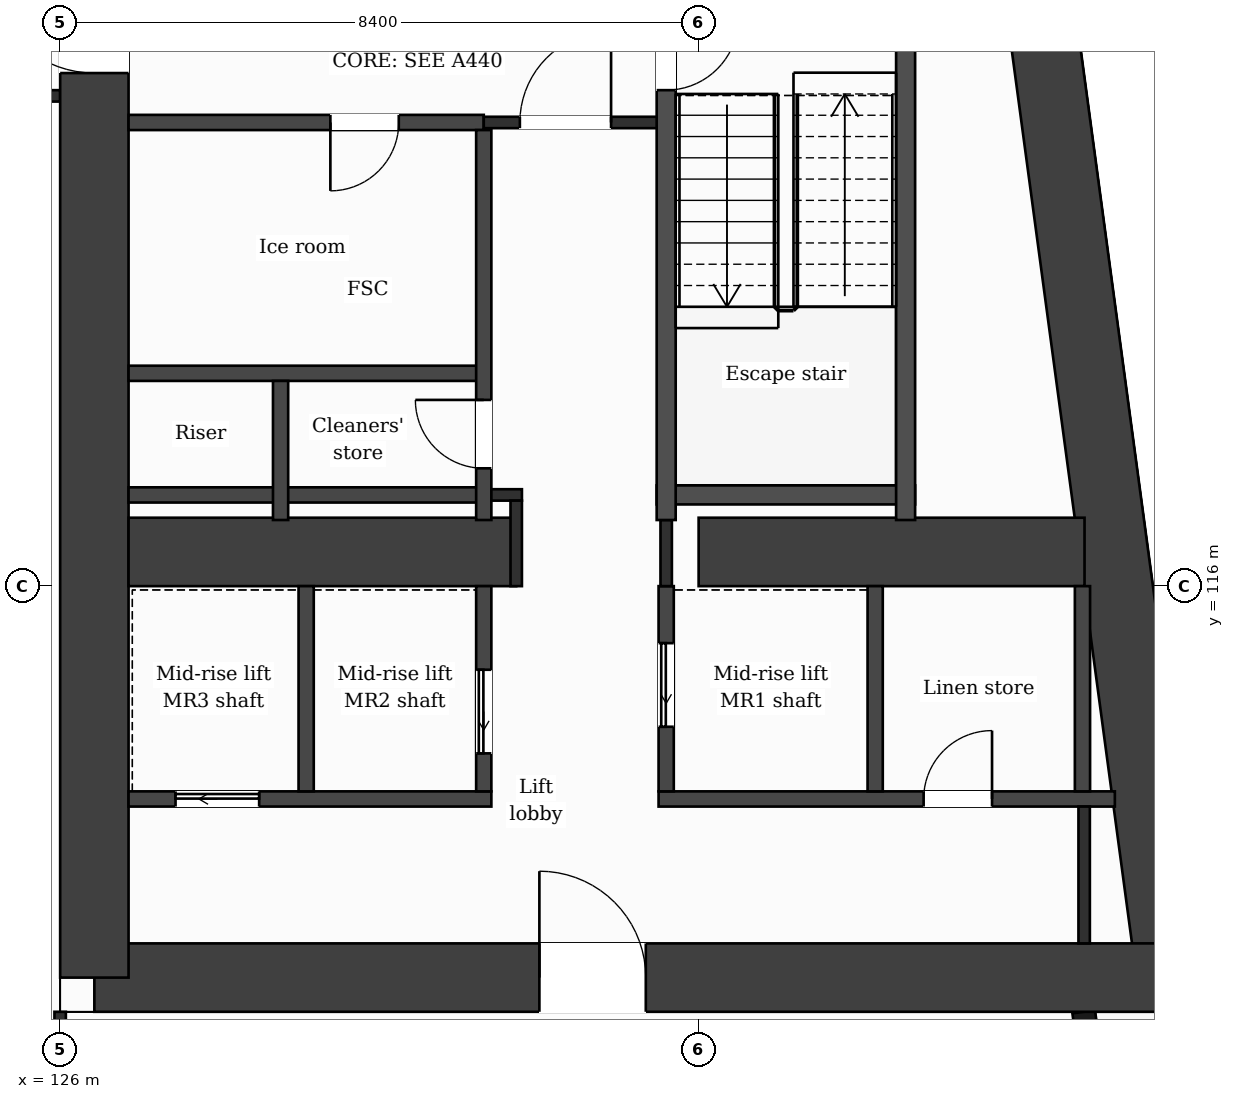
"""IFC4 building model, lengths in metres.
Left out: names, types, materials, properties, quantities, classifications, styles, units other than length and angle.
Written with IfcOpenShell. Run it as: python <this file> out.ifc"""

import sys

from ifc_helpers import new_model, si_unit, direction, frame, frame_2d, origin, place, context, subcontext, project, spatial, rectangle, extrude, element, fill, save


model = new_model("IFC4")
c1 = context("Model", 3, precision=1e-05, world=origin(), true_north=direction((0.0, 1.0)))
c2 = subcontext(c1, "Body", "Model", "MODEL_VIEW")
j1 = project(units=[si_unit("LENGTHUNIT", "METRE"), si_unit("PLANEANGLEUNIT", "RADIAN")], contexts=[c1])
p1 = place(None, origin())
s1 = spatial("IfcSite", under=j1, at=p1, CompositionType="ELEMENT")
p2 = place(p1, origin())
s2 = spatial("IfcBuilding", under=s1, at=p2, CompositionType="ELEMENT")
p3 = place(p2, frame((0.0, 0.0, 166.3)))
s3 = spatial("IfcBuildingStorey", under=s2, at=p3, CompositionType="ELEMENT", Elevation=166.3)
p4 = place(p3, frame((137.776, 131.95, 0.0), z_axis=(0.0, 0.0, 1.0), x_axis=(0.133421759112, -0.991059349482, 0.0)))
e1 = element("IfcWall", 1, at=p4, inside=s3, PredefinedType="SHEAR", context=c2, shape_type="SweptSolid", body=[
    extrude(rectangle(XDim=21.29, YDim=0.9, at=frame_2d((10.645, 0.0))), origin(), (0.0, 0.0, 1.0), 3.7),
])
p5 = place(p3, frame((140.616, 110.85, 0.0), z_axis=(0.0, 0.0, 1.0), x_axis=(-1.0, 0.0, 0.0)))
e2 = element("IfcWall", 2, at=p5, inside=s3, PredefinedType="SHEAR", context=c2, shape_type="SweptSolid", body=[
    extrude(rectangle(XDim=14.166, YDim=0.9, at=frame_2d((7.083, 0.0))), origin(), (0.0, 0.0, 1.0), 3.7),
])
p6 = place(p5, frame((6.911, 0.0, 0.0)))
e3 = element("IfcOpeningElement", 3, at=p6, cuts=e2, PredefinedType="OPENING", context=c2, shape_type="SweptSolid", body=[
    extrude(rectangle(XDim=1.4, YDim=2.1, at=frame_2d((0.7, 1.05))), frame((0.0, 0.46, 0.0), z_axis=(0.0, -1.0, 0.0), x_axis=(1.0, 0.0, 0.0)), (0.0, 0.0, 1.0), 0.92),
])
p7 = place(p3, frame((126.45, 110.85, 0.0), z_axis=(0.0, 0.0, 1.0), x_axis=(0.0, 1.0, 0.0)))
e4 = element("IfcWall", 4, at=p7, inside=s3, PredefinedType="SHEAR", context=c2, shape_type="SweptSolid", body=[
    extrude(rectangle(XDim=21.1, YDim=0.9, at=frame_2d((10.55, 0.0))), origin(), (0.0, 0.0, 1.0), 3.7),
])
p8 = place(p7, frame((11.9, 0.0, 0.0)))
e5 = element("IfcOpeningElement", 5, at=p8, cuts=e4, PredefinedType="OPENING", context=c2, shape_type="SweptSolid", body=[
    extrude(rectangle(XDim=1.4, YDim=2.1, at=frame_2d((0.7, 1.05))), frame((0.0, 0.46, 0.0), z_axis=(0.0, -1.0, 0.0), x_axis=(1.0, 0.0, 0.0)), (0.0, 0.0, 1.0), 0.92),
])
p9 = place(p3, frame((126.9, 116.45, 0.0), z_axis=(0.0, 0.0, 1.0), x_axis=(1.0, 0.0, 0.0)))
e6 = element("IfcWall", 6, at=p9, inside=s3, PredefinedType="SHEAR", context=c2, shape_type="SweptSolid", body=[
    extrude(rectangle(XDim=5.1, YDim=0.9, at=frame_2d((2.55, 0.0))), origin(), (0.0, 0.0, 1.0), 3.7),
])
p10 = place(p3, frame((134.4, 116.45, 0.0), z_axis=(0.0, 0.0, 1.0), x_axis=(1.0, 0.0, 0.0)))
e7 = element("IfcWall", 7, at=p10, inside=s3, PredefinedType="SHEAR", context=c2, shape_type="SweptSolid", body=[
    extrude(rectangle(XDim=5.077, YDim=0.9, at=frame_2d((2.539, 0.0))), origin(), (0.0, 0.0, 1.0), 3.7),
])
p11 = place(p3, frame((140.348, 103.85, 0.0), z_axis=(0.0, 0.0, 1.0), x_axis=(-0.133431549479, 0.991058031401, 0.0)))
e8 = element("IfcWall", 8, at=p11, inside=s3, PredefinedType="SOLIDWALL", context=c2, shape_type="SweptSolid", body=[
    extrude(rectangle(XDim=6.609, YDim=0.3, at=frame_2d((3.304, 0.0))), origin(), (0.0, 0.0, 1.0), 3.38),
])
p12 = place(p11, frame((0.737, 0.0, 0.9)))
e9 = element("IfcOpeningElement", 9, at=p12, cuts=e8, PredefinedType="OPENING", context=c2, shape_type="SweptSolid", body=[
    extrude(rectangle(XDim=1.2, YDim=2.1, at=frame_2d((0.6, 1.05))), frame((0.0, 0.16, 0.0), z_axis=(0.0, -1.0, 0.0), x_axis=(1.0, 0.0, 0.0)), (0.0, 0.0, 1.0), 0.32),
])
p13 = place(p11, frame((3.991, 0.0, 0.0)))
e10 = element("IfcOpeningElement", 10, at=p13, cuts=e8, PredefinedType="OPENING", context=c2, shape_type="SweptSolid", body=[
    extrude(rectangle(XDim=1.2, YDim=2.4, at=frame_2d((0.6, 1.2))), frame((0.0, 0.16, 0.0), z_axis=(0.0, -1.0, 0.0), x_axis=(1.0, 0.0, 0.0)), (0.0, 0.0, 1.0), 0.32),
])
p14 = place(p3, frame((126.9, 113.2, 0.0), z_axis=(0.0, 0.0, 1.0), x_axis=(1.0, 0.0, 0.0)))
e11 = element("IfcWall", 11, at=p14, inside=s3, PredefinedType="PARTITIONING", context=c2, shape_type="SweptSolid", body=[
    extrude(rectangle(XDim=4.773, YDim=0.2, at=frame_2d((2.387, 0.0))), origin(), (0.0, 0.0, 1.0), 3.38),
])
p15 = place(p14, frame((0.618, 0.0, 0.0)))
e12 = element("IfcOpeningElement", 12, at=p15, cuts=e11, PredefinedType="OPENING", context=c2, shape_type="SweptSolid", body=[
    extrude(rectangle(XDim=1.1, YDim=2.1, at=frame_2d((0.55, 1.05))), frame((0.0, 0.11, 0.0), z_axis=(0.0, -1.0, 0.0), x_axis=(1.0, 0.0, 0.0)), (0.0, 0.0, 1.0), 0.22),
])
p16 = place(p3, frame((133.873, 113.2, 0.0), z_axis=(0.0, 0.0, 1.0), x_axis=(1.0, 0.0, 0.0)))
e13 = element("IfcWall", 13, at=p16, inside=s3, PredefinedType="PARTITIONING", context=c2, shape_type="SweptSolid", body=[
    extrude(rectangle(XDim=6.003, YDim=0.2, at=frame_2d((3.001, 0.0))), origin(), (0.0, 0.0, 1.0), 3.38),
])
p17 = place(p16, frame((3.487, 0.0, 0.0)))
e14 = element("IfcOpeningElement", 14, at=p17, cuts=e13, PredefinedType="OPENING", context=c2, shape_type="SweptSolid", body=[
    extrude(rectangle(XDim=0.9, YDim=2.1, at=frame_2d((0.45, 1.05))), frame((0.0, 0.11, 0.0), z_axis=(0.0, -1.0, 0.0), x_axis=(1.0, 0.0, 0.0)), (0.0, 0.0, 1.0), 0.22),
])
p18 = place(p3, frame((126.9, 117.2, 0.0), z_axis=(0.0, 0.0, 1.0), x_axis=(1.0, 0.0, 0.0)))
e15 = element("IfcWall", 15, at=p18, inside=s3, PredefinedType="PARTITIONING", context=c2, shape_type="SweptSolid", body=[
    extrude(rectangle(XDim=4.673, YDim=0.2, at=frame_2d((2.336, 0.0))), origin(), (0.0, 0.0, 1.0), 3.38),
])
p19 = place(p3, frame((131.573, 117.2, 0.0), z_axis=(0.0, 0.0, 1.0), x_axis=(1.0, 0.0, 0.0)))
e16 = element("IfcWall", 16, at=p19, inside=s3, PredefinedType="PARTITIONING", context=c2, shape_type="SweptSolid", body=[
    extrude(rectangle(XDim=0.502, YDim=0.15, at=frame_2d((0.251, 0.0))), origin(), (0.0, 0.0, 1.0), 3.38),
])
p20 = place(p3, frame((133.848, 117.2, 0.0), z_axis=(0.0, 0.0, 1.0), x_axis=(1.0, 0.0, 0.0)))
e17 = element("IfcWall", 17, at=p20, inside=s3, PredefinedType="PARTITIONING", context=c2, shape_type="SweptSolid", body=[
    extrude(rectangle(XDim=3.4, YDim=0.25, at=frame_2d((1.7, 0.0))), origin(), (0.0, 0.0, 1.0), 3.38),
])
p21 = place(p3, frame((126.9, 118.8, 0.0), z_axis=(0.0, 0.0, 1.0), x_axis=(1.0, 0.0, 0.0)))
e18 = element("IfcWall", 18, at=p21, inside=s3, PredefinedType="PARTITIONING", context=c2, shape_type="SweptSolid", body=[
    extrude(rectangle(XDim=4.673, YDim=0.2, at=frame_2d((2.336, 0.0))), origin(), (0.0, 0.0, 1.0), 3.38),
])
p22 = place(p3, frame((126.9, 122.1, 0.0), z_axis=(0.0, 0.0, 1.0), x_axis=(1.0, 0.0, 0.0)))
e19 = element("IfcWall", 19, at=p22, inside=s3, PredefinedType="PARTITIONING", context=c2, shape_type="SweptSolid", body=[
    extrude(rectangle(XDim=4.673, YDim=0.2, at=frame_2d((2.336, 0.0))), origin(), (0.0, 0.0, 1.0), 3.38),
])
p23 = place(p22, frame((2.655, 0.0, 0.0)))
e20 = element("IfcOpeningElement", 20, at=p23, cuts=e19, PredefinedType="OPENING", context=c2, shape_type="SweptSolid", body=[
    extrude(rectangle(XDim=0.9, YDim=2.1, at=frame_2d((0.45, 1.05))), frame((0.0, 0.11, 0.0), z_axis=(0.0, -1.0, 0.0), x_axis=(1.0, 0.0, 0.0)), (0.0, 0.0, 1.0), 0.22),
])
p24 = place(p3, frame((131.573, 122.1, 0.0), z_axis=(0.0, 0.0, 1.0), x_axis=(1.0, 0.0, 0.0)))
e21 = element("IfcWall", 21, at=p24, inside=s3, PredefinedType="PARTITIONING", context=c2, shape_type="SweptSolid", body=[
    extrude(rectangle(XDim=2.4, YDim=0.15, at=frame_2d((1.2, 0.0))), origin(), (0.0, 0.0, 1.0), 3.38),
])
p25 = place(p24, frame((0.475, 0.0, 0.0)))
e22 = element("IfcOpeningElement", 22, at=p25, cuts=e21, PredefinedType="OPENING", context=c2, shape_type="SweptSolid", body=[
    extrude(rectangle(XDim=1.2, YDim=2.1, at=frame_2d((0.6, 1.05))), frame((0.0, 0.085, 0.0), z_axis=(0.0, -1.0, 0.0), x_axis=(1.0, 0.0, 0.0)), (0.0, 0.0, 1.0), 0.17),
])
p26 = place(p3, frame((100.8, 122.45, 0.0), z_axis=(0.0, 0.0, 1.0), x_axis=(1.0, 0.0, 0.0)))
e23 = element("IfcWall", 23, at=p26, inside=s3, PredefinedType="PARTITIONING", context=c2, shape_type="SweptSolid", body=[
    extrude(rectangle(XDim=25.2, YDim=0.15, at=frame_2d((12.6, 0.0))), origin(), (0.0, 0.0, 1.0), 3.38),
])
p27 = place(p3, frame((126.0, 109.075, 0.0), z_axis=(0.0, 0.0, 1.0), x_axis=(0.0, 1.0, 0.0)))
e24 = element("IfcWall", 24, at=p27, inside=s3, PredefinedType="PARTITIONING", context=c2, shape_type="SweptSolid", body=[
    extrude(rectangle(XDim=1.325, YDim=0.15, at=frame_2d((0.663, 0.0))), origin(), (0.0, 0.0, 1.0), 3.38),
])
p28 = place(p3, frame((128.9, 116.87, 0.0), z_axis=(0.0, 0.0, 1.0), x_axis=(0.0, 1.0, 0.0)))
e25 = element("IfcWall", 25, at=p28, inside=s3, PredefinedType="PARTITIONING", context=c2, shape_type="SweptSolid", body=[
    extrude(rectangle(XDim=1.83, YDim=0.2, at=frame_2d((0.915, 0.0))), origin(), (0.0, 0.0, 1.0), 3.38),
])
p29 = place(p3, frame((129.237, 113.3, 0.0), z_axis=(0.0, 0.0, 1.0), x_axis=(0.0, 1.0, 0.0)))
e26 = element("IfcWall", 26, at=p29, inside=s3, PredefinedType="PARTITIONING", context=c2, shape_type="SweptSolid", body=[
    extrude(rectangle(XDim=2.7, YDim=0.2, at=frame_2d((1.35, 0.0))), origin(), (0.0, 0.0, 1.0), 3.38),
])
p30 = place(p3, frame((131.573, 113.3, 0.0), z_axis=(0.0, 0.0, 1.0), x_axis=(0.0, 1.0, 0.0)))
e27 = element("IfcWall", 27, at=p30, inside=s3, PredefinedType="PARTITIONING", context=c2, shape_type="SweptSolid", body=[
    extrude(rectangle(XDim=2.7, YDim=0.2, at=frame_2d((1.35, 0.0))), origin(), (0.0, 0.0, 1.0), 3.38),
])
p31 = place(p30, frame((0.5, 0.0, 0.0)))
e28 = element("IfcOpeningElement", 28, at=p31, cuts=e27, PredefinedType="OPENING", context=c2, shape_type="SweptSolid", body=[
    extrude(rectangle(XDim=1.1, YDim=2.1, at=frame_2d((0.55, 1.05))), frame((0.0, 0.11, 0.0), z_axis=(0.0, -1.0, 0.0), x_axis=(1.0, 0.0, 0.0)), (0.0, 0.0, 1.0), 0.22),
])
p32 = place(p3, frame((131.573, 116.87, 0.0), z_axis=(0.0, 0.0, 1.0), x_axis=(0.0, 1.0, 0.0)))
e29 = element("IfcWall", 29, at=p32, inside=s3, PredefinedType="PARTITIONING", context=c2, shape_type="SweptSolid", body=[
    extrude(rectangle(XDim=5.13, YDim=0.2, at=frame_2d((2.565, 0.0))), origin(), (0.0, 0.0, 1.0), 3.38),
])
p33 = place(p32, frame((0.68, 0.0, 0.0)))
e30 = element("IfcOpeningElement", 30, at=p33, cuts=e29, PredefinedType="OPENING", context=c2, shape_type="SweptSolid", body=[
    extrude(rectangle(XDim=0.9, YDim=2.1, at=frame_2d((0.45, 1.05))), frame((0.0, 0.11, 0.0), z_axis=(0.0, -1.0, 0.0), x_axis=(1.0, 0.0, 0.0)), (0.0, 0.0, 1.0), 0.22),
])
p34 = place(p3, frame((132.0, 116.0, 0.0), z_axis=(0.0, 0.0, 1.0), x_axis=(0.0, 1.0, 0.0)))
e31 = element("IfcWall", 31, at=p34, inside=s3, PredefinedType="PARTITIONING", context=c2, shape_type="SweptSolid", body=[
    extrude(rectangle(XDim=1.125, YDim=0.15, at=frame_2d((0.562, 0.0))), origin(), (0.0, 0.0, 1.0), 3.38),
])
p35 = place(p3, frame((133.973, 113.3, 0.0), z_axis=(0.0, 0.0, 1.0), x_axis=(0.0, 1.0, 0.0)))
e32 = element("IfcWall", 32, at=p35, inside=s3, PredefinedType="PARTITIONING", context=c2, shape_type="SweptSolid", body=[
    extrude(rectangle(XDim=2.7, YDim=0.2, at=frame_2d((1.35, 0.0))), origin(), (0.0, 0.0, 1.0), 3.38),
])
p36 = place(p35, frame((0.85, 0.0, 0.0)))
e33 = element("IfcOpeningElement", 33, at=p36, cuts=e32, PredefinedType="OPENING", context=c2, shape_type="SweptSolid", body=[
    extrude(rectangle(XDim=1.1, YDim=2.1, at=frame_2d((0.55, 1.05))), frame((0.0, 0.11, 0.0), z_axis=(0.0, -1.0, 0.0), x_axis=(1.0, 0.0, 0.0)), (0.0, 0.0, 1.0), 0.22),
])
p37 = place(p3, frame((133.973, 116.0, 0.0), z_axis=(0.0, 0.0, 1.0), x_axis=(0.0, 1.0, 0.0)))
e34 = element("IfcWall", 34, at=p37, inside=s3, PredefinedType="PARTITIONING", context=c2, shape_type="SweptSolid", body=[
    extrude(rectangle(XDim=0.87, YDim=0.15, at=frame_2d((0.435, 0.0))), origin(), (0.0, 0.0, 1.0), 3.38),
])
p38 = place(p3, frame((133.973, 116.87, 0.0), z_axis=(0.0, 0.0, 1.0), x_axis=(0.0, 1.0, 0.0)))
e35 = element("IfcWall", 35, at=p38, inside=s3, PredefinedType="PARTITIONING", context=c2, shape_type="SweptSolid", body=[
    extrude(rectangle(XDim=6.955, YDim=0.25, at=frame_2d((3.478, 0.0))), origin(), (0.0, 0.0, 1.0), 3.38),
])
p39 = place(p38, frame((5.655, 0.0, 0.0)))
e36 = element("IfcOpeningElement", 36, at=p39, cuts=e35, PredefinedType="OPENING", context=c2, shape_type="SweptSolid", body=[
    extrude(rectangle(XDim=0.95, YDim=2.1, at=frame_2d((0.475, 1.05))), frame((0.0, 0.135, 0.0), z_axis=(0.0, -1.0, 0.0), x_axis=(1.0, 0.0, 0.0)), (0.0, 0.0, 1.0), 0.27),
])
p40 = place(p3, frame((136.722, 113.3, 0.0), z_axis=(0.0, 0.0, 1.0), x_axis=(0.0, 1.0, 0.0)))
e37 = element("IfcWall", 37, at=p40, inside=s3, PredefinedType="PARTITIONING", context=c2, shape_type="SweptSolid", body=[
    extrude(rectangle(XDim=2.7, YDim=0.2, at=frame_2d((1.35, 0.0))), origin(), (0.0, 0.0, 1.0), 3.38),
])
p41 = place(p3, frame((137.123, 116.87, 0.0), z_axis=(0.0, 0.0, 1.0), x_axis=(0.0, 1.0, 0.0)))
e38 = element("IfcWall", 38, at=p41, inside=s3, PredefinedType="PARTITIONING", context=c2, shape_type="SweptSolid", body=[
    extrude(rectangle(XDim=6.955, YDim=0.25, at=frame_2d((3.478, 0.0))), origin(), (0.0, 0.0, 1.0), 3.38),
])
p42 = place(p3, frame((139.45, 113.3, 0.0), z_axis=(0.0, 0.0, 1.0), x_axis=(0.0, 1.0, 0.0)))
e39 = element("IfcWall", 39, at=p42, inside=s3, PredefinedType="PARTITIONING", context=c2, shape_type="SweptSolid", body=[
    extrude(rectangle(XDim=2.7, YDim=0.2, at=frame_2d((1.35, 0.0))), origin(), (0.0, 0.0, 1.0), 3.38),
])
p43 = place(p3, frame((139.472, 111.3, 0.0), z_axis=(0.0, 0.0, 1.0), x_axis=(0.0, 1.0, 0.0)))
e40 = element("IfcWall", 40, at=p43, inside=s3, PredefinedType="PARTITIONING", context=c2, shape_type="SweptSolid", body=[
    extrude(rectangle(XDim=1.8, YDim=0.15, at=frame_2d((0.9, 0.0))), origin(), (0.0, 0.0, 1.0), 3.38),
])
p44 = place(p25, origin())
e41 = element("IfcDoor", 41, at=p44, inside=s3, OperationType="SINGLE_SWING_RIGHT", PredefinedType="DOOR", context=c2, shape_type="SweptSolid", body=[
    extrude(rectangle(XDim=1.2, YDim=2.1, at=frame_2d((0.6, 1.05))), frame((0.0, 0.025, 0.0), z_axis=(0.0, -1.0, 0.0), x_axis=(1.0, 0.0, 0.0)), (0.0, 0.0, 1.0), 0.05),
])
fill(e22, e41)
p45 = place(p23, origin())
e42 = element("IfcDoor", 42, at=p45, inside=s3, OperationType="SINGLE_SWING_LEFT", PredefinedType="DOOR", context=c2, shape_type="SweptSolid", body=[
    extrude(rectangle(XDim=0.9, YDim=2.1, at=frame_2d((0.45, 1.05))), frame((0.0, 0.025, 0.0), z_axis=(0.0, -1.0, 0.0), x_axis=(1.0, 0.0, 0.0)), (0.0, 0.0, 1.0), 0.05),
])
fill(e20, e42)
p46 = place(p39, origin())
e43 = element("IfcDoor", 43, at=p46, inside=s3, OperationType="SINGLE_SWING_RIGHT", PredefinedType="DOOR", context=c2, shape_type="SweptSolid", body=[
    extrude(rectangle(XDim=0.95, YDim=2.1, at=frame_2d((0.475, 1.05))), frame((0.0, 0.025, 0.0), z_axis=(0.0, -1.0, 0.0), x_axis=(1.0, 0.0, 0.0)), (0.0, 0.0, 1.0), 0.05),
])
fill(e36, e43)
p47 = place(p33, origin())
e44 = element("IfcDoor", 44, at=p47, inside=s3, OperationType="SINGLE_SWING_RIGHT", PredefinedType="DOOR", context=c2, shape_type="SweptSolid", body=[
    extrude(rectangle(XDim=0.9, YDim=2.1, at=frame_2d((0.45, 1.05))), frame((0.0, 0.025, 0.0), z_axis=(0.0, -1.0, 0.0), x_axis=(1.0, 0.0, 0.0)), (0.0, 0.0, 1.0), 0.05),
])
fill(e30, e44)
p48 = place(p36, origin())
e45 = element("IfcDoor", 45, at=p48, inside=s3, OperationType="SLIDING_TO_LEFT", PredefinedType="DOOR", context=c2, shape_type="SweptSolid", body=[
    extrude(rectangle(XDim=1.1, YDim=2.1, at=frame_2d((0.55, 1.05))), frame((0.0, 0.025, 0.0), z_axis=(0.0, -1.0, 0.0), x_axis=(1.0, 0.0, 0.0)), (0.0, 0.0, 1.0), 0.05),
])
fill(e33, e45)
p49 = place(p31, origin())
e46 = element("IfcDoor", 46, at=p49, inside=s3, OperationType="SLIDING_TO_LEFT", PredefinedType="DOOR", context=c2, shape_type="SweptSolid", body=[
    extrude(rectangle(XDim=1.1, YDim=2.1, at=frame_2d((0.55, 1.05))), frame((0.0, 0.025, 0.0), z_axis=(0.0, -1.0, 0.0), x_axis=(1.0, 0.0, 0.0)), (0.0, 0.0, 1.0), 0.05),
])
fill(e28, e46)
p50 = place(p15, origin())
e47 = element("IfcDoor", 47, at=p50, inside=s3, OperationType="SLIDING_TO_LEFT", PredefinedType="DOOR", context=c2, shape_type="SweptSolid", body=[
    extrude(rectangle(XDim=1.1, YDim=2.1, at=frame_2d((0.55, 1.05))), frame((0.0, 0.025, 0.0), z_axis=(0.0, -1.0, 0.0), x_axis=(1.0, 0.0, 0.0)), (0.0, 0.0, 1.0), 0.05),
])
fill(e12, e47)
p51 = place(p17, origin())
e48 = element("IfcDoor", 48, at=p51, inside=s3, OperationType="SINGLE_SWING_RIGHT", PredefinedType="DOOR", context=c2, shape_type="SweptSolid", body=[
    extrude(rectangle(XDim=0.9, YDim=2.1, at=frame_2d((0.45, 1.05))), frame((0.0, 0.025, 0.0), z_axis=(0.0, -1.0, 0.0), x_axis=(1.0, 0.0, 0.0)), (0.0, 0.0, 1.0), 0.05),
])
fill(e14, e48)
p52 = place(p6, origin())
e49 = element("IfcDoor", 49, at=p52, inside=s3, OperationType="SINGLE_SWING_RIGHT", PredefinedType="DOOR", context=c2, shape_type="SweptSolid", body=[
    extrude(rectangle(XDim=1.4, YDim=2.1, at=frame_2d((0.7, 1.05))), frame((0.0, 0.025, 0.0), z_axis=(0.0, -1.0, 0.0), x_axis=(1.0, 0.0, 0.0)), (0.0, 0.0, 1.0), 0.05),
])
fill(e3, e49)
p53 = place(p8, origin())
e50 = element("IfcDoor", 50, at=p53, inside=s3, OperationType="SINGLE_SWING_RIGHT", PredefinedType="DOOR", context=c2, shape_type="SweptSolid", body=[
    extrude(rectangle(XDim=1.4, YDim=2.1, at=frame_2d((0.7, 1.05))), frame((0.0, 0.025, 0.0), z_axis=(0.0, -1.0, 0.0), x_axis=(1.0, 0.0, 0.0)), (0.0, 0.0, 1.0), 0.05),
])
fill(e5, e50)
save(model, sys.argv[1])
